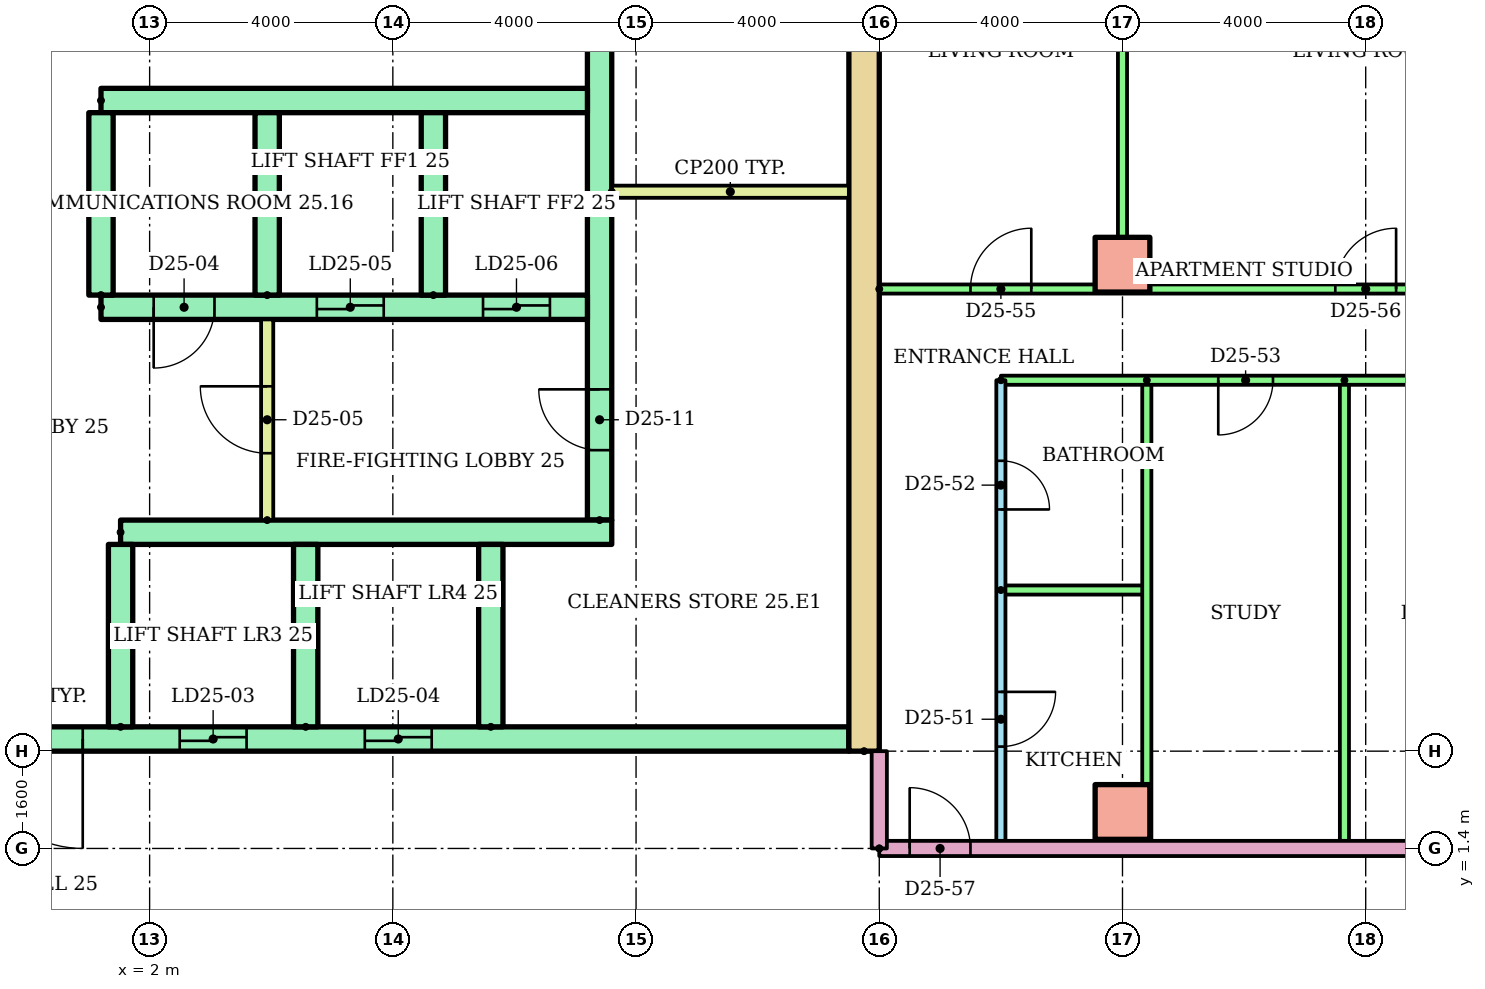
"""IFC4 building model, lengths in metres.
Left out: names, types, materials, properties, quantities, classifications, styles, units other than length and angle.
Written with IfcOpenShell. Run it as: python <this file> out.ifc"""

import sys

from ifc_helpers import new_model, si_unit, direction, frame, frame_2d, origin, origin_2d, place, context, subcontext, project, spatial, rectangle, extrude, element, fill, save


model = new_model("IFC4")
c1 = context("Model", 3, precision=1e-05, world=origin(), true_north=direction((0.0, 1.0)))
c2 = subcontext(c1, "Body", "Model", "MODEL_VIEW")
j1 = project(units=[si_unit("LENGTHUNIT", "METRE"), si_unit("PLANEANGLEUNIT", "RADIAN")], contexts=[c1])
p1 = place(None, origin())
s1 = spatial("IfcSite", under=j1, at=p1, CompositionType="ELEMENT")
p2 = place(p1, origin())
s2 = spatial("IfcBuilding", under=s1, at=p2, CompositionType="ELEMENT")
p3 = place(p2, frame((0.0, 0.0, 96.7)))
s3 = spatial("IfcBuildingStorey", under=s2, at=p3, CompositionType="ELEMENT", Elevation=96.7)
for number, where in (
    (1, (18.0, 2.0, 0.0)),
    (2, (18.0, 11.0, 0.0)),
):
    element("IfcColumn", number, at=place(p3, frame(where)), inside=s3, PredefinedType="COLUMN", context=c2, shape_type="SweptSolid", body=[
        extrude(rectangle(XDim=0.9, YDim=0.9, at=origin_2d()), origin(), (0.0, 0.0, 1.0), 3.2),
    ])
p4 = place(p3, frame((13.75, 3.0, 0.0), z_axis=(0.0, 0.0, 1.0), x_axis=(0.0, 1.0, 0.0)))
e3 = element("IfcWall", 3, at=p4, inside=s3, PredefinedType="SHEAR", context=c2, shape_type="SweptSolid", body=[
    extrude(rectangle(XDim=17.0, YDim=0.5, at=frame_2d((8.5, 0.0))), origin(), (0.0, 0.0, 1.0), 2.92),
])
p5 = place(p3, frame((9.4, 6.8, 0.0), z_axis=(0.0, 0.0, 1.0), x_axis=(0.0, 1.0, 0.0)))
e4 = element("IfcWall", 4, at=p5, inside=s3, PredefinedType="SHEAR", context=c2, shape_type="SweptSolid", body=[
    extrude(rectangle(XDim=12.7, YDim=0.4, at=frame_2d((6.35, 0.0))), origin(), (0.0, 0.0, 1.0), 2.92),
])
p6 = place(p5, frame((1.15, 0.0, 0.0)))
e5 = element("IfcOpeningElement", 5, at=p6, cuts=e4, PredefinedType="OPENING", context=c2, shape_type="SweptSolid", body=[
    extrude(rectangle(XDim=1.0, YDim=2.1, at=frame_2d((0.5, 1.05))), frame((0.0, 0.21, 0.0), z_axis=(0.0, -1.0, 0.0), x_axis=(1.0, 0.0, 0.0)), (0.0, 0.0, 1.0), 0.42),
])
p7 = place(p5, frame((7.925, 0.0, 0.0)))
e6 = element("IfcOpeningElement", 6, at=p7, cuts=e4, PredefinedType="OPENING", context=c2, shape_type="SweptSolid", body=[
    extrude(rectangle(XDim=1.0, YDim=2.1, at=frame_2d((0.5, 1.05))), frame((0.0, 0.21, 0.0), z_axis=(0.0, -1.0, 0.0), x_axis=(1.0, 0.0, 0.0)), (0.0, 0.0, 1.0), 0.42),
])
p8 = place(p3, frame((-13.5, 3.2, 0.0)))
e7 = element("IfcWall", 7, at=p8, inside=s3, PredefinedType="SHEAR", context=c2, shape_type="SweptSolid", body=[
    extrude(rectangle(XDim=27.0, YDim=0.4, at=frame_2d((13.5, 0.0))), origin(), (0.0, 0.0, 1.0), 2.92),
])
p9 = place(p8, frame((6.861, 0.0, 0.0)))
e8 = element("IfcOpeningElement", 8, at=p9, cuts=e7, PredefinedType="OPENING", context=c2, shape_type="SweptSolid", body=[
    extrude(rectangle(XDim=1.1, YDim=2.1, at=frame_2d((0.55, 1.05))), frame((0.0, 0.21, 0.0), z_axis=(0.0, -1.0, 0.0), x_axis=(1.0, 0.0, 0.0)), (0.0, 0.0, 1.0), 0.42),
])
p10 = place(p8, frame((9.906, 0.0, 0.0)))
e9 = element("IfcOpeningElement", 9, at=p10, cuts=e7, PredefinedType="OPENING", context=c2, shape_type="SweptSolid", body=[
    extrude(rectangle(XDim=1.1, YDim=2.1, at=frame_2d((0.55, 1.05))), frame((0.0, 0.21, 0.0), z_axis=(0.0, -1.0, 0.0), x_axis=(1.0, 0.0, 0.0)), (0.0, 0.0, 1.0), 0.42),
])
p11 = place(p8, frame((15.994, 0.0, 0.0)))
e10 = element("IfcOpeningElement", 10, at=p11, cuts=e7, PredefinedType="OPENING", context=c2, shape_type="SweptSolid", body=[
    extrude(rectangle(XDim=1.1, YDim=2.1, at=frame_2d((0.55, 1.05))), frame((0.0, 0.21, 0.0), z_axis=(0.0, -1.0, 0.0), x_axis=(1.0, 0.0, 0.0)), (0.0, 0.0, 1.0), 0.42),
])
p12 = place(p8, frame((19.039, 0.0, 0.0)))
e11 = element("IfcOpeningElement", 11, at=p12, cuts=e7, PredefinedType="OPENING", context=c2, shape_type="SweptSolid", body=[
    extrude(rectangle(XDim=1.1, YDim=2.1, at=frame_2d((0.55, 1.05))), frame((0.0, 0.21, 0.0), z_axis=(0.0, -1.0, 0.0), x_axis=(1.0, 0.0, 0.0)), (0.0, 0.0, 1.0), 0.42),
])
p13 = place(p8, frame((12.6, 0.0, 0.0)))
e12 = element("IfcOpeningElement", 12, at=p13, cuts=e7, PredefinedType="OPENING", context=c2, shape_type="SweptSolid", body=[
    extrude(rectangle(XDim=1.8, YDim=2.1, at=frame_2d((0.9, 1.05))), frame((0.0, 0.21, 0.0), z_axis=(0.0, -1.0, 0.0), x_axis=(1.0, 0.0, 0.0)), (0.0, 0.0, 1.0), 0.42),
])
p14 = place(p3, frame((1.522, 6.6, 0.0)))
e13 = element("IfcWall", 13, at=p14, inside=s3, PredefinedType="SHEAR", context=c2, shape_type="SweptSolid", body=[
    extrude(rectangle(XDim=8.078, YDim=0.4, at=frame_2d((4.039, 0.0))), origin(), (0.0, 0.0, 1.0), 2.92),
])
for number, where, z_axis, x_axis in (
    (14, (1.522, 3.4, 0.0), (0.0, 0.0, 1.0), (0.0, 1.0, 0.0)),
    (15, (4.567, 3.4, 0.0), (0.0, 0.0, 1.0), (0.0, 1.0, 0.0)),
    (16, (7.611, 3.4, 0.0), (0.0, 0.0, 1.0), (0.0, 1.0, 0.0)),
):
    element("IfcWall", number, at=place(p3, frame(where, z_axis=z_axis, x_axis=x_axis)), inside=s3, PredefinedType="SHEAR", context=c2, shape_type="SweptSolid", body=[
        extrude(rectangle(XDim=3.0, YDim=0.4, at=frame_2d((1.5, 0.0))), origin(), (0.0, 0.0, 1.0), 2.92),
    ])
p15 = place(p3, frame((1.2, 10.3, 0.0)))
e17 = element("IfcWall", 17, at=p15, inside=s3, PredefinedType="SHEAR", context=c2, shape_type="SweptSolid", body=[
    extrude(rectangle(XDim=8.0, YDim=0.4, at=frame_2d((4.0, 0.0))), origin(), (0.0, 0.0, 1.0), 2.92),
])
p16 = place(p15, frame((3.55, 0.0, 0.0)))
e18 = element("IfcOpeningElement", 18, at=p16, cuts=e17, PredefinedType="OPENING", context=c2, shape_type="SweptSolid", body=[
    extrude(rectangle(XDim=1.1, YDim=2.1, at=frame_2d((0.55, 1.05))), frame((0.0, 0.21, 0.0), z_axis=(0.0, -1.0, 0.0), x_axis=(1.0, 0.0, 0.0)), (0.0, 0.0, 1.0), 0.42),
])
p17 = place(p15, frame((6.283, 0.0, 0.0)))
e19 = element("IfcOpeningElement", 19, at=p17, cuts=e17, PredefinedType="OPENING", context=c2, shape_type="SweptSolid", body=[
    extrude(rectangle(XDim=1.1, YDim=2.1, at=frame_2d((0.55, 1.05))), frame((0.0, 0.21, 0.0), z_axis=(0.0, -1.0, 0.0), x_axis=(1.0, 0.0, 0.0)), (0.0, 0.0, 1.0), 0.42),
])
p18 = place(p15, frame((0.867, 0.0, 0.0)))
e20 = element("IfcOpeningElement", 20, at=p18, cuts=e17, PredefinedType="OPENING", context=c2, shape_type="SweptSolid", body=[
    extrude(rectangle(XDim=1.0, YDim=2.1, at=frame_2d((0.5, 1.05))), frame((0.0, 0.21, 0.0), z_axis=(0.0, -1.0, 0.0), x_axis=(1.0, 0.0, 0.0)), (0.0, 0.0, 1.0), 0.42),
])
p19 = place(p3, frame((1.2, 13.7, 0.0)))
e21 = element("IfcWall", 21, at=p19, inside=s3, PredefinedType="SHEAR", context=c2, shape_type="SweptSolid", body=[
    extrude(rectangle(XDim=8.0, YDim=0.4, at=frame_2d((4.0, 0.0))), origin(), (0.0, 0.0, 1.0), 2.92),
])
for number, where, z_axis, x_axis in (
    (22, (1.2, 10.5, 0.0), (0.0, 0.0, 1.0), (0.0, 1.0, 0.0)),
    (23, (3.933, 10.5, 0.0), (0.0, 0.0, 1.0), (0.0, 1.0, 0.0)),
    (24, (6.667, 10.5, 0.0), (0.0, 0.0, 1.0), (0.0, 1.0, 0.0)),
):
    element("IfcWall", number, at=place(p3, frame(where, z_axis=z_axis, x_axis=x_axis)), inside=s3, PredefinedType="SHEAR", context=c2, shape_type="SweptSolid", body=[
        extrude(rectangle(XDim=3.0, YDim=0.4, at=frame_2d((1.5, 0.0))), origin(), (0.0, 0.0, 1.0), 2.92),
    ])
p20 = place(p3, frame((3.933, 6.8, 0.0), z_axis=(0.0, 0.0, 1.0), x_axis=(0.0, 1.0, 0.0)))
e25 = element("IfcWall", 25, at=p20, inside=s3, PredefinedType="PARTITIONING", context=c2, shape_type="SweptSolid", body=[
    extrude(rectangle(XDim=3.3, YDim=0.2, at=frame_2d((1.65, 0.0))), origin(), (0.0, 0.0, 1.0), 2.92),
])
p21 = place(p20, frame((1.1, 0.0, 0.0)))
e26 = element("IfcOpeningElement", 26, at=p21, cuts=e25, PredefinedType="OPENING", context=c2, shape_type="SweptSolid", body=[
    extrude(rectangle(XDim=1.1, YDim=2.1, at=frame_2d((0.55, 1.05))), frame((0.0, 0.11, 0.0), z_axis=(0.0, -1.0, 0.0), x_axis=(1.0, 0.0, 0.0)), (0.0, 0.0, 1.0), 0.22),
])
p22 = place(p3, frame((9.6, 12.2, 0.0)))
e27 = element("IfcWall", 27, at=p22, inside=s3, PredefinedType="PARTITIONING", context=c2, shape_type="SweptSolid", body=[
    extrude(rectangle(XDim=3.9, YDim=0.2, at=frame_2d((1.95, 0.0))), origin(), (0.0, 0.0, 1.0), 2.92),
])
p23 = place(p3, frame((16.0, 9.1, 0.0), z_axis=(0.0, 0.0, 1.0), x_axis=(0.0, -1.0, 0.0)))
e28 = element("IfcWall", 28, at=p23, inside=s3, PredefinedType="PARTITIONING", context=c2, shape_type="SweptSolid", body=[
    extrude(rectangle(XDim=7.7, YDim=0.15, at=frame_2d((3.85, 0.0))), origin(), (0.0, 0.0, 1.0), 2.4),
])
p24 = place(p23, frame((5.125, 0.0, 0.0)))
e29 = element("IfcOpeningElement", 29, at=p24, cuts=e28, PredefinedType="OPENING", context=c2, shape_type="SweptSolid", body=[
    extrude(rectangle(XDim=0.9, YDim=2.1, at=frame_2d((0.45, 1.05))), frame((0.0, 0.085, 0.0), z_axis=(0.0, -1.0, 0.0), x_axis=(1.0, 0.0, 0.0)), (0.0, 0.0, 1.0), 0.17),
])
p25 = place(p23, frame((1.325, 0.0, 0.0)))
e30 = element("IfcOpeningElement", 30, at=p25, cuts=e28, PredefinedType="OPENING", context=c2, shape_type="SweptSolid", body=[
    extrude(rectangle(XDim=0.8, YDim=2.1, at=frame_2d((0.4, 1.05))), frame((0.0, 0.085, 0.0), z_axis=(0.0, -1.0, 0.0), x_axis=(1.0, 0.0, 0.0)), (0.0, 0.0, 1.0), 0.17),
])
p26 = place(p3, frame((16.0, 5.65, 0.0)))
e31 = element("IfcWall", 31, at=p26, inside=s3, PredefinedType="PARTITIONING", context=c2, shape_type="SweptSolid", body=[
    extrude(rectangle(XDim=2.4, YDim=0.15, at=frame_2d((1.2, 0.0))), origin(), (0.0, 0.0, 1.0), 2.4),
])
for number, where, z_axis, x_axis in (
    (32, (18.4, 9.1, 0.0), (0.0, 0.0, 1.0), (0.0, -1.0, 0.0)),
    (33, (21.65, 9.1, 0.0), (0.0, 0.0, 1.0), (0.0, -1.0, 0.0)),
):
    element("IfcWall", number, at=place(p3, frame(where, z_axis=z_axis, x_axis=x_axis)), inside=s3, PredefinedType="PARTITIONING", context=c2, shape_type="SweptSolid", body=[
        extrude(rectangle(XDim=7.7, YDim=0.15, at=frame_2d((3.85, 0.0))), origin(), (0.0, 0.0, 1.0), 2.4),
    ])
p27 = place(p3, frame((26.0, 9.1, 0.0), z_axis=(0.0, 0.0, 1.0), x_axis=(-1.0, 0.0, 0.0)))
e34 = element("IfcWall", 34, at=p27, inside=s3, PredefinedType="PARTITIONING", context=c2, shape_type="SweptSolid", body=[
    extrude(rectangle(XDim=10.0, YDim=0.15, at=frame_2d((5.0, 0.0))), origin(), (0.0, 0.0, 1.0), 2.4),
])
p28 = place(p27, frame((5.525, 0.0, 0.0)))
e35 = element("IfcOpeningElement", 35, at=p28, cuts=e34, PredefinedType="OPENING", context=c2, shape_type="SweptSolid", body=[
    extrude(rectangle(XDim=0.9, YDim=2.1, at=frame_2d((0.45, 1.05))), frame((0.0, 0.085, 0.0), z_axis=(0.0, -1.0, 0.0), x_axis=(1.0, 0.0, 0.0)), (0.0, 0.0, 1.0), 0.17),
])
p29 = place(p27, frame((1.725, 0.0, 0.0)))
e36 = element("IfcOpeningElement", 36, at=p29, cuts=e34, PredefinedType="OPENING", context=c2, shape_type="SweptSolid", body=[
    extrude(rectangle(XDim=0.9, YDim=2.1, at=frame_2d((0.45, 1.05))), frame((0.0, 0.085, 0.0), z_axis=(0.0, -1.0, 0.0), x_axis=(1.0, 0.0, 0.0)), (0.0, 0.0, 1.0), 0.17),
])
p30 = place(p3, frame((14.0, 10.6, 0.0)))
e37 = element("IfcWall", 37, at=p30, inside=s3, PredefinedType="PARTITIONING", context=c2, shape_type="SweptSolid", body=[
    extrude(rectangle(XDim=12.0, YDim=0.15, at=frame_2d((6.0, 0.0))), origin(), (0.0, 0.0, 1.0), 2.4),
])
p31 = place(p30, frame((1.5, 0.0, 0.0)))
e38 = element("IfcOpeningElement", 38, at=p31, cuts=e37, PredefinedType="OPENING", context=c2, shape_type="SweptSolid", body=[
    extrude(rectangle(XDim=1.0, YDim=2.1, at=frame_2d((0.5, 1.05))), frame((0.0, 0.085, 0.0), z_axis=(0.0, -1.0, 0.0), x_axis=(1.0, 0.0, 0.0)), (0.0, 0.0, 1.0), 0.17),
])
p32 = place(p30, frame((7.5, 0.0, 0.0)))
e39 = element("IfcOpeningElement", 39, at=p32, cuts=e37, PredefinedType="OPENING", context=c2, shape_type="SweptSolid", body=[
    extrude(rectangle(XDim=1.0, YDim=2.1, at=frame_2d((0.5, 1.05))), frame((0.0, 0.085, 0.0), z_axis=(0.0, -1.0, 0.0), x_axis=(1.0, 0.0, 0.0)), (0.0, 0.0, 1.0), 0.17),
])
p33 = place(p3, frame((18.0, 18.621, 0.0), z_axis=(0.0, 0.0, 1.0), x_axis=(0.0, -1.0, 0.0)))
e40 = element("IfcWall", 40, at=p33, inside=s3, PredefinedType="PARTITIONING", context=c2, shape_type="SweptSolid", body=[
    extrude(rectangle(XDim=8.021, YDim=0.15, at=frame_2d((4.01, 0.0))), origin(), (0.0, 0.0, 1.0), 2.4),
])
p34 = place(p3, frame((14.0, 1.4, 0.0)))
e41 = element("IfcWall", 41, at=p34, inside=s3, PredefinedType="PARTITIONING", context=c2, shape_type="SweptSolid", body=[
    extrude(rectangle(XDim=15.0, YDim=0.25, at=frame_2d((7.5, 0.0))), origin(), (0.0, 0.0, 1.0), 2.4),
])
p35 = place(p34, frame((0.5, 0.0, 0.0)))
e42 = element("IfcOpeningElement", 42, at=p35, cuts=e41, PredefinedType="OPENING", context=c2, shape_type="SweptSolid", body=[
    extrude(rectangle(XDim=1.0, YDim=2.1, at=frame_2d((0.5, 1.05))), frame((0.0, 0.135, 0.0), z_axis=(0.0, -1.0, 0.0), x_axis=(1.0, 0.0, 0.0)), (0.0, 0.0, 1.0), 0.27),
])
p36 = place(p34, frame((12.689, 0.0, 0.0)))
e43 = element("IfcOpeningElement", 43, at=p36, cuts=e41, PredefinedType="OPENING", context=c2, shape_type="SweptSolid", body=[
    extrude(rectangle(XDim=1.0, YDim=2.1, at=frame_2d((0.5, 1.05))), frame((0.0, 0.135, 0.0), z_axis=(0.0, -1.0, 0.0), x_axis=(1.0, 0.0, 0.0)), (0.0, 0.0, 1.0), 0.27),
])
p37 = place(p3, frame((14.0, 1.4, 0.0), z_axis=(0.0, 0.0, 1.0), x_axis=(0.0, 1.0, 0.0)))
e44 = element("IfcWall", 44, at=p37, inside=s3, PredefinedType="PARTITIONING", context=c2, shape_type="SweptSolid", body=[
    extrude(rectangle(XDim=1.6, YDim=0.25, at=frame_2d((0.8, 0.0))), origin(), (0.0, 0.0, 1.0), 2.4),
])
p38 = place(p11, origin())
e45 = element("IfcDoor", 45, at=p38, inside=s3, OperationType="SLIDING_TO_LEFT", PredefinedType="DOOR", context=c2, shape_type="SweptSolid", body=[
    extrude(rectangle(XDim=1.1, YDim=2.1, at=frame_2d((0.55, 1.05))), frame((0.0, 0.025, 0.0), z_axis=(0.0, -1.0, 0.0), x_axis=(1.0, 0.0, 0.0)), (0.0, 0.0, 1.0), 0.05),
])
fill(e10, e45)
p39 = place(p12, origin())
e46 = element("IfcDoor", 46, at=p39, inside=s3, OperationType="SLIDING_TO_LEFT", PredefinedType="DOOR", context=c2, shape_type="SweptSolid", body=[
    extrude(rectangle(XDim=1.1, YDim=2.1, at=frame_2d((0.55, 1.05))), frame((0.0, 0.025, 0.0), z_axis=(0.0, -1.0, 0.0), x_axis=(1.0, 0.0, 0.0)), (0.0, 0.0, 1.0), 0.05),
])
fill(e11, e46)
p40 = place(p13, frame((1.8, 0.0, 0.0), z_axis=(0.0, 0.0, 1.0), x_axis=(-1.0, 0.0, 0.0)))
e47 = element("IfcDoor", 47, at=p40, inside=s3, OperationType="DOUBLE_DOOR_SINGLE_SWING", PredefinedType="DOOR", context=c2, shape_type="SweptSolid", body=[
    extrude(rectangle(XDim=1.8, YDim=2.1, at=frame_2d((0.9, 1.05))), frame((0.0, 0.025, 0.0), z_axis=(0.0, -1.0, 0.0), x_axis=(1.0, 0.0, 0.0)), (0.0, 0.0, 1.0), 0.05),
])
fill(e12, e47)
p41 = place(p16, origin())
e48 = element("IfcDoor", 48, at=p41, inside=s3, OperationType="SLIDING_TO_LEFT", PredefinedType="DOOR", context=c2, shape_type="SweptSolid", body=[
    extrude(rectangle(XDim=1.1, YDim=2.1, at=frame_2d((0.55, 1.05))), frame((0.0, 0.025, 0.0), z_axis=(0.0, -1.0, 0.0), x_axis=(1.0, 0.0, 0.0)), (0.0, 0.0, 1.0), 0.05),
])
fill(e18, e48)
p42 = place(p17, origin())
e49 = element("IfcDoor", 49, at=p42, inside=s3, OperationType="SLIDING_TO_LEFT", PredefinedType="DOOR", context=c2, shape_type="SweptSolid", body=[
    extrude(rectangle(XDim=1.1, YDim=2.1, at=frame_2d((0.55, 1.05))), frame((0.0, 0.025, 0.0), z_axis=(0.0, -1.0, 0.0), x_axis=(1.0, 0.0, 0.0)), (0.0, 0.0, 1.0), 0.05),
])
fill(e19, e49)
p43 = place(p18, frame((1.0, 0.0, 0.0), z_axis=(0.0, 0.0, 1.0), x_axis=(-1.0, 0.0, 0.0)))
e50 = element("IfcDoor", 50, at=p43, inside=s3, OperationType="SINGLE_SWING_LEFT", PredefinedType="DOOR", context=c2, shape_type="SweptSolid", body=[
    extrude(rectangle(XDim=1.0, YDim=2.1, at=frame_2d((0.5, 1.05))), frame((0.0, 0.025, 0.0), z_axis=(0.0, -1.0, 0.0), x_axis=(1.0, 0.0, 0.0)), (0.0, 0.0, 1.0), 0.05),
])
fill(e20, e50)
p44 = place(p21, origin())
e51 = element("IfcDoor", 51, at=p44, inside=s3, OperationType="SINGLE_SWING_RIGHT", PredefinedType="DOOR", context=c2, shape_type="SweptSolid", body=[
    extrude(rectangle(XDim=1.1, YDim=2.1, at=frame_2d((0.55, 1.05))), frame((0.0, 0.025, 0.0), z_axis=(0.0, -1.0, 0.0), x_axis=(1.0, 0.0, 0.0)), (0.0, 0.0, 1.0), 0.05),
])
fill(e26, e51)
p45 = place(p6, origin())
e52 = element("IfcDoor", 52, at=p45, inside=s3, OperationType="SINGLE_SWING_RIGHT", PredefinedType="DOOR", context=c2, shape_type="SweptSolid", body=[
    extrude(rectangle(XDim=1.0, YDim=2.1, at=frame_2d((0.5, 1.05))), frame((0.0, 0.025, 0.0), z_axis=(0.0, -1.0, 0.0), x_axis=(1.0, 0.0, 0.0)), (0.0, 0.0, 1.0), 0.05),
])
fill(e5, e52)
p46 = place(p24, origin())
e53 = element("IfcDoor", 53, at=p46, inside=s3, OperationType="SINGLE_SWING_LEFT", PredefinedType="DOOR", context=c2, shape_type="SweptSolid", body=[
    extrude(rectangle(XDim=0.9, YDim=2.1, at=frame_2d((0.45, 1.05))), frame((0.0, 0.025, 0.0), z_axis=(0.0, -1.0, 0.0), x_axis=(1.0, 0.0, 0.0)), (0.0, 0.0, 1.0), 0.05),
])
fill(e29, e53)
p47 = place(p25, origin())
e54 = element("IfcDoor", 54, at=p47, inside=s3, OperationType="SINGLE_SWING_RIGHT", PredefinedType="DOOR", context=c2, shape_type="SweptSolid", body=[
    extrude(rectangle(XDim=0.8, YDim=2.1, at=frame_2d((0.4, 1.05))), frame((0.0, 0.025, 0.0), z_axis=(0.0, -1.0, 0.0), x_axis=(1.0, 0.0, 0.0)), (0.0, 0.0, 1.0), 0.05),
])
fill(e30, e54)
p48 = place(p28, origin())
e55 = element("IfcDoor", 55, at=p48, inside=s3, OperationType="SINGLE_SWING_RIGHT", PredefinedType="DOOR", context=c2, shape_type="SweptSolid", body=[
    extrude(rectangle(XDim=0.9, YDim=2.1, at=frame_2d((0.45, 1.05))), frame((0.0, 0.025, 0.0), z_axis=(0.0, -1.0, 0.0), x_axis=(1.0, 0.0, 0.0)), (0.0, 0.0, 1.0), 0.05),
])
fill(e35, e55)
p49 = place(p31, origin())
e56 = element("IfcDoor", 56, at=p49, inside=s3, OperationType="SINGLE_SWING_RIGHT", PredefinedType="DOOR", context=c2, shape_type="SweptSolid", body=[
    extrude(rectangle(XDim=1.0, YDim=2.1, at=frame_2d((0.5, 1.05))), frame((0.0, 0.025, 0.0), z_axis=(0.0, -1.0, 0.0), x_axis=(1.0, 0.0, 0.0)), (0.0, 0.0, 1.0), 0.05),
])
fill(e38, e56)
p50 = place(p32, origin())
e57 = element("IfcDoor", 57, at=p50, inside=s3, OperationType="SINGLE_SWING_RIGHT", PredefinedType="DOOR", context=c2, shape_type="SweptSolid", body=[
    extrude(rectangle(XDim=1.0, YDim=2.1, at=frame_2d((0.5, 1.05))), frame((0.0, 0.025, 0.0), z_axis=(0.0, -1.0, 0.0), x_axis=(1.0, 0.0, 0.0)), (0.0, 0.0, 1.0), 0.05),
])
fill(e39, e57)
p51 = place(p35, origin())
e58 = element("IfcDoor", 58, at=p51, inside=s3, OperationType="SINGLE_SWING_LEFT", PredefinedType="DOOR", context=c2, shape_type="SweptSolid", body=[
    extrude(rectangle(XDim=1.0, YDim=2.1, at=frame_2d((0.5, 1.05))), frame((0.0, 0.025, 0.0), z_axis=(0.0, -1.0, 0.0), x_axis=(1.0, 0.0, 0.0)), (0.0, 0.0, 1.0), 0.05),
])
fill(e42, e58)
save(model, sys.argv[1])
